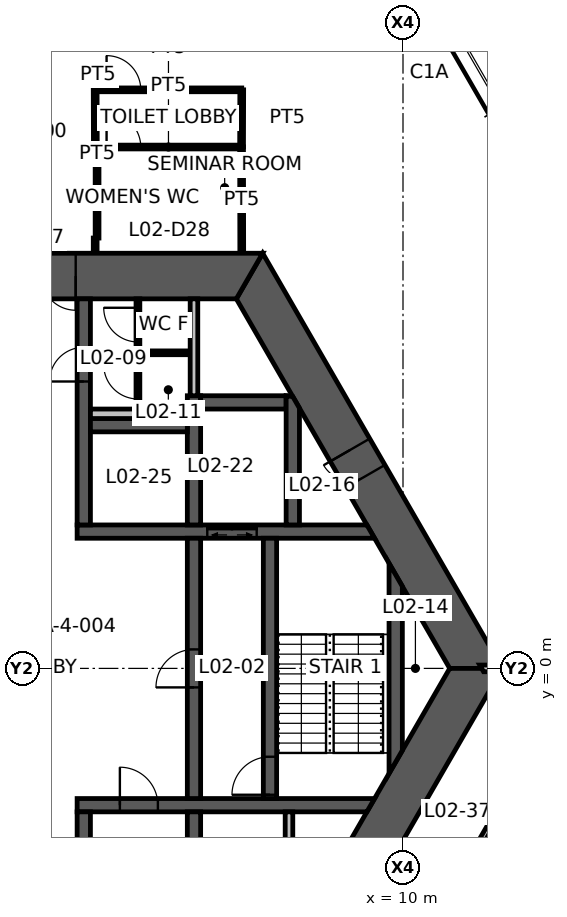
"""IFC4 building model, lengths in metres.
Left out: names, types, materials, properties, quantities, classifications, styles, units other than length and angle.
Written with IfcOpenShell. Run it as: python <this file> out.ifc"""

import sys

from ifc_helpers import new_model, si_unit, direction, frame, frame_2d, origin, place, context, subcontext, project, spatial, polyline, rectangle, outline, extrude, element, fill, save


model = new_model("IFC4")
c1 = context("Model", 3, precision=1e-05, world=origin(), true_north=direction((0.0, 1.0)))
c2 = subcontext(c1, "Body", "Model", "MODEL_VIEW")
j1 = project(units=[si_unit("LENGTHUNIT", "METRE"), si_unit("PLANEANGLEUNIT", "RADIAN")], contexts=[c1])
p1 = place(None, origin())
s1 = spatial("IfcSite", under=j1, at=p1, CompositionType="ELEMENT")
p2 = place(p1, origin())
s2 = spatial("IfcBuilding", under=s1, at=p2, CompositionType="ELEMENT")
p3 = place(p2, frame((0.0, 0.0, 5.5)))
s3 = spatial("IfcBuildingStorey", under=s2, at=p3, CompositionType="ELEMENT", Elevation=5.5)
p4 = place(p3, frame((11.922, 0.0, 0.0), z_axis=(0.0, 0.0, 1.0), x_axis=(-0.500004296715, 0.866022923061, 0.0)))
e1 = element("IfcWall", 1, at=p4, inside=s3, PredefinedType="SHEAR", context=c2, shape_type="SweptSolid", body=[
    extrude(outline(polyline([(-0.346, -0.6), (5.835, -0.6), (6.635, -0.6), (12.269, -0.6), (11.576, 0.6), (6.635, 0.6), (5.835, 0.6), (0.346, 0.6), (-0.346, -0.6)])), origin(), (0.0, 0.0, 1.0), 4.5),
])
p5 = place(p4, frame((5.835, 0.0, 0.0)))
e2 = element("IfcOpeningElement", 2, at=p5, cuts=e1, PredefinedType="OPENING", context=c2, shape_type="SweptSolid", body=[
    extrude(rectangle(XDim=0.8, YDim=2.1, at=frame_2d((0.4, 1.05))), frame((0.0, 0.61, 0.0), z_axis=(0.0, -1.0, 0.0), x_axis=(1.0, 0.0, 0.0)), (0.0, 0.0, 1.0), 1.22),
])
p6 = place(p3, frame((5.961, 10.325, 0.0), z_axis=(0.0, 0.0, 1.0), x_axis=(-1.0, 0.0, 0.0)))
e3 = element("IfcWall", 3, at=p6, inside=s3, PredefinedType="SHEAR", context=c2, shape_type="SweptSolid", body=[
    extrude(outline(polyline([(-0.346, -0.6), (4.574, -0.6), (5.474, -0.6), (6.449, -0.6), (7.349, -0.6), (12.269, -0.6), (11.576, 0.6), (7.349, 0.6), (6.449, 0.6), (5.474, 0.6), (4.574, 0.6), (0.346, 0.6), (-0.346, -0.6)])), origin(), (0.0, 0.0, 1.0), 4.5),
])
p7 = place(p6, frame((6.449, 0.0, 0.0)))
e4 = element("IfcOpeningElement", 4, at=p7, cuts=e3, PredefinedType="OPENING", context=c2, shape_type="SweptSolid", body=[
    extrude(rectangle(XDim=0.9, YDim=2.1, at=frame_2d((0.45, 1.05))), frame((0.0, 0.61, 0.0), z_axis=(0.0, -1.0, 0.0), x_axis=(1.0, 0.0, 0.0)), (0.0, 0.0, 1.0), 1.22),
])
p8 = place(p6, frame((4.574, 0.0, 0.0)))
e5 = element("IfcOpeningElement", 5, at=p8, cuts=e3, PredefinedType="OPENING", context=c2, shape_type="SweptSolid", body=[
    extrude(rectangle(XDim=0.9, YDim=2.1, at=frame_2d((0.45, 1.05))), frame((0.0, 0.61, 0.0), z_axis=(0.0, -1.0, 0.0), x_axis=(1.0, 0.0, 0.0)), (0.0, 0.0, 1.0), 1.22),
])
p9 = place(p3, frame((5.961, -10.325, 0.0), z_axis=(0.0, 0.0, 1.0), x_axis=(0.500004296715, 0.866022923061, 0.0)))
e6 = element("IfcWall", 6, at=p9, inside=s3, PredefinedType="SHEAR", context=c2, shape_type="SweptSolid", body=[
    extrude(outline(polyline([(-0.346, -0.6), (3.208, -0.6), (4.009, -0.6), (12.269, -0.6), (11.576, 0.6), (4.009, 0.6), (3.208, 0.6), (0.346, 0.6), (-0.346, -0.6)])), origin(), (0.0, 0.0, 1.0), 4.5),
])
p10 = place(p9, frame((3.208, 0.0, 0.0)))
e7 = element("IfcOpeningElement", 7, at=p10, cuts=e6, PredefinedType="OPENING", context=c2, shape_type="SweptSolid", body=[
    extrude(rectangle(XDim=0.8, YDim=2.1, at=frame_2d((0.4, 1.05))), frame((0.0, 0.61, 0.0), z_axis=(0.0, -1.0, 0.0), x_axis=(1.0, 0.0, 0.0)), (0.0, 0.0, 1.0), 1.22),
])
p11 = place(p3, frame((1.425, 3.6, 0.0), z_axis=(0.0, 0.0, 1.0), x_axis=(1.0, 0.0, 0.0)))
e8 = element("IfcWall", 8, at=p11, inside=s3, PredefinedType="SHEAR", context=c2, shape_type="SweptSolid", body=[
    extrude(outline(polyline([(0.0, -0.175), (3.425, -0.175), (4.725, -0.175), (7.827, -0.175), (7.625, 0.175), (4.725, 0.175), (3.425, 0.175), (0.0, 0.175), (0.0, -0.175)])), origin(), (0.0, 0.0, 1.0), 4.5),
])
p12 = place(p11, frame((3.425, 0.0, 0.0)))
e9 = element("IfcOpeningElement", 9, at=p12, cuts=e8, PredefinedType="OPENING", context=c2, shape_type="SweptSolid", body=[
    extrude(rectangle(XDim=1.3, YDim=2.1, at=frame_2d((0.65, 1.05))), frame((0.0, 0.185, 0.0), z_axis=(0.0, -1.0, 0.0), x_axis=(1.0, 0.0, 0.0)), (0.0, 0.0, 1.0), 0.37),
])
p13 = place(p3, frame((1.425, -3.6, 0.0), z_axis=(0.0, 0.0, 1.0), x_axis=(1.0, 0.0, 0.0)))
e10 = element("IfcWall", 10, at=p13, inside=s3, PredefinedType="SHEAR", context=c2, shape_type="SweptSolid", body=[
    extrude(outline(polyline([(0.0, -0.175), (1.125, -0.175), (2.125, -0.175), (7.625, -0.175), (7.827, 0.175), (2.125, 0.175), (1.125, 0.175), (0.0, 0.175), (0.0, -0.175)])), origin(), (0.0, 0.0, 1.0), 4.5),
])
p14 = place(p13, frame((1.125, 0.0, 0.0)))
e11 = element("IfcOpeningElement", 11, at=p14, cuts=e10, PredefinedType="OPENING", context=c2, shape_type="SweptSolid", body=[
    extrude(rectangle(XDim=1.0, YDim=2.1, at=frame_2d((0.5, 1.05))), frame((0.0, 0.185, 0.0), z_axis=(0.0, -1.0, 0.0), x_axis=(1.0, 0.0, 0.0)), (0.0, 0.0, 1.0), 0.37),
])
p15 = place(p3, frame((1.6, 3.775, 0.0), z_axis=(0.0, 0.0, 1.0), x_axis=(0.0, 1.0, 0.0)))
e12 = element("IfcWall", 12, at=p15, inside=s3, PredefinedType="SHEAR", context=c2, shape_type="SweptSolid", body=[
    extrude(rectangle(XDim=5.95, YDim=0.35, at=frame_2d((2.975, 0.0))), origin(), (0.0, 0.0, 1.0), 4.5),
])
p16 = place(p15, frame((3.775, 0.0, 0.0)))
e13 = element("IfcOpeningElement", 13, at=p16, cuts=e12, PredefinedType="OPENING", context=c2, shape_type="SweptSolid", body=[
    extrude(rectangle(XDim=0.9, YDim=2.1, at=frame_2d((0.45, 1.05))), frame((0.0, 0.185, 0.0), z_axis=(0.0, -1.0, 0.0), x_axis=(1.0, 0.0, 0.0)), (0.0, 0.0, 1.0), 0.37),
])
p17 = place(p3, frame((1.6, -3.775, 0.0), z_axis=(0.0, 0.0, 1.0), x_axis=(0.0, -1.0, 0.0)))
e14 = element("IfcWall", 14, at=p17, inside=s3, PredefinedType="SHEAR", context=c2, shape_type="SweptSolid", body=[
    extrude(rectangle(XDim=5.95, YDim=0.35, at=frame_2d((2.975, 0.0))), origin(), (0.0, 0.0, 1.0), 4.5),
])
p18 = place(p17, frame((3.625, 0.0, 0.0)))
e15 = element("IfcOpeningElement", 15, at=p18, cuts=e14, PredefinedType="OPENING", context=c2, shape_type="SweptSolid", body=[
    extrude(rectangle(XDim=1.2, YDim=2.1, at=frame_2d((0.6, 1.05))), frame((0.0, 0.185, 0.0), z_axis=(0.0, -1.0, 0.0), x_axis=(1.0, 0.0, 0.0)), (0.0, 0.0, 1.0), 0.37),
])
p19 = place(p3, frame((4.5, -3.425, 0.0), z_axis=(0.0, 0.0, 1.0), x_axis=(0.0, 1.0, 0.0)))
e16 = element("IfcWall", 16, at=p19, inside=s3, PredefinedType="SHEAR", context=c2, shape_type="SweptSolid", body=[
    extrude(rectangle(XDim=6.85, YDim=0.35, at=frame_2d((3.425, 0.0))), origin(), (0.0, 0.0, 1.0), 4.5),
])
p20 = place(p19, frame((2.925, 0.0, 0.0)))
e17 = element("IfcOpeningElement", 17, at=p20, cuts=e16, PredefinedType="OPENING", context=c2, shape_type="SweptSolid", body=[
    extrude(rectangle(XDim=1.0, YDim=2.1, at=frame_2d((0.5, 1.05))), frame((0.0, 0.185, 0.0), z_axis=(0.0, -1.0, 0.0), x_axis=(1.0, 0.0, 0.0)), (0.0, 0.0, 1.0), 0.37),
])
p21 = place(p3, frame((6.5, -3.425, 0.0), z_axis=(0.0, 0.0, 1.0), x_axis=(0.0, 1.0, 0.0)))
e18 = element("IfcWall", 18, at=p21, inside=s3, PredefinedType="SHEAR", context=c2, shape_type="SweptSolid", body=[
    extrude(rectangle(XDim=6.85, YDim=0.35, at=frame_2d((3.425, 0.0))), origin(), (0.0, 0.0, 1.0), 4.5),
])
p22 = place(p21, frame((0.1, 0.0, 0.0)))
e19 = element("IfcOpeningElement", 19, at=p22, cuts=e18, PredefinedType="OPENING", context=c2, shape_type="SweptSolid", body=[
    extrude(rectangle(XDim=1.0, YDim=2.1, at=frame_2d((0.5, 1.05))), frame((0.0, 0.185, 0.0), z_axis=(0.0, -1.0, 0.0), x_axis=(1.0, 0.0, 0.0)), (0.0, 0.0, 1.0), 0.37),
])
p23 = place(p3, frame((4.5, 3.775, 0.0), z_axis=(0.0, 0.0, 1.0), x_axis=(0.0, 1.0, 0.0)))
e20 = element("IfcWall", 20, at=p23, inside=s3, PredefinedType="SHEAR", context=c2, shape_type="SweptSolid", body=[
    extrude(rectangle(XDim=3.4, YDim=0.35, at=frame_2d((1.7, 0.0))), origin(), (0.0, 0.0, 1.0), 4.5),
])
p24 = place(p3, frame((4.5, -3.775, 0.0), z_axis=(0.0, 0.0, 1.0), x_axis=(0.0, -1.0, 0.0)))
e21 = element("IfcWall", 21, at=p24, inside=s3, PredefinedType="SHEAR", context=c2, shape_type="SweptSolid", body=[
    extrude(rectangle(XDim=5.95, YDim=0.35, at=frame_2d((2.975, 0.0))), origin(), (0.0, 0.0, 1.0), 4.5),
])
p25 = place(p24, frame((0.712, 0.0, 0.0)))
e22 = element("IfcOpeningElement", 22, at=p25, cuts=e21, PredefinedType="OPENING", context=c2, shape_type="SweptSolid", body=[
    extrude(rectangle(XDim=1.1, YDim=2.1, at=frame_2d((0.55, 1.05))), frame((0.0, 0.185, 0.0), z_axis=(0.0, -1.0, 0.0), x_axis=(1.0, 0.0, 0.0)), (0.0, 0.0, 1.0), 0.37),
])
p26 = place(p3, frame((1.775, 6.4, 0.0), z_axis=(0.0, 0.0, 1.0), x_axis=(1.0, 0.0, 0.0)))
e23 = element("IfcWall", 23, at=p26, inside=s3, PredefinedType="SHEAR", context=c2, shape_type="SweptSolid", body=[
    extrude(rectangle(XDim=2.55, YDim=0.35, at=frame_2d((1.275, 0.0))), origin(), (0.0, 0.0, 1.0), 4.5),
])
p27 = place(p3, frame((4.675, 7.0, 0.0), z_axis=(0.0, 0.0, 1.0), x_axis=(1.0, 0.0, 0.0)))
e24 = element("IfcWall", 24, at=p27, inside=s3, PredefinedType="SHEAR", context=c2, shape_type="SweptSolid", body=[
    extrude(rectangle(XDim=2.25, YDim=0.35, at=frame_2d((1.125, 0.0))), origin(), (0.0, 0.0, 1.0), 4.5),
])
p28 = place(p3, frame((7.1, 3.775, 0.0), z_axis=(0.0, 0.0, 1.0), x_axis=(0.0, 1.0, 0.0)))
e25 = element("IfcWall", 25, at=p28, inside=s3, PredefinedType="SHEAR", context=c2, shape_type="SweptSolid", body=[
    extrude(outline(polyline([(0.0, -0.175), (3.074, -0.175), (3.377, 0.0), (3.4, 0.175), (0.0, 0.175), (0.0, -0.175)])), origin(), (0.0, 0.0, 1.0), 4.5),
])
p29 = place(p3, frame((9.808, -2.462, 0.0), z_axis=(0.0, 0.0, 1.0), x_axis=(0.0, 1.0, 0.0)))
e26 = element("IfcWall", 26, at=p29, inside=s3, PredefinedType="SHEAR", context=c2, shape_type="SweptSolid", body=[
    extrude(outline(polyline([(0.303, -0.175), (4.621, -0.175), (5.228, 0.175), (-0.303, 0.175), (0.303, -0.175)])), origin(), (0.0, 0.0, 1.0), 4.5),
])
p30 = place(p3, frame((4.5, 7.175, 0.0), z_axis=(0.0, 0.0, 1.0), x_axis=(0.0, 1.0, 0.0)))
e27 = element("IfcWall", 27, at=p30, inside=s3, PredefinedType="STANDARD", context=c2, shape_type="SweptSolid", body=[
    extrude(rectangle(XDim=2.55, YDim=0.2, at=frame_2d((1.275, 0.0))), origin(), (0.0, 0.0, 1.0), 4.5),
])
p31 = place(p3, frame((7.0, -3.775, 0.0), z_axis=(0.0, 0.0, 1.0), x_axis=(0.0, -1.0, 0.0)))
e28 = element("IfcWall", 28, at=p31, inside=s3, PredefinedType="STANDARD", context=c2, shape_type="SweptSolid", body=[
    extrude(rectangle(XDim=2.525, YDim=0.2, at=frame_2d((1.263, 0.0))), origin(), (0.0, 0.0, 1.0), 4.5),
])
p32 = place(p3, frame((1.775, 6.7, 0.0), z_axis=(0.0, 0.0, 1.0), x_axis=(1.0, 0.0, 0.0)))
e29 = element("IfcWall", 29, at=p32, inside=s3, PredefinedType="PLUMBINGWALL", context=c2, shape_type="SweptSolid", body=[
    extrude(rectangle(XDim=2.55, YDim=0.25, at=frame_2d((1.275, 0.0))), origin(), (0.0, 0.0, 1.0), 4.5),
])
p33 = place(p3, frame((3.025, 6.575, 0.0), z_axis=(0.0, 0.0, 1.0), x_axis=(0.0, 1.0, 0.0)))
e30 = element("IfcWall", 30, at=p33, inside=s3, PredefinedType="PARTITIONING", context=c2, shape_type="SweptSolid", body=[
    extrude(rectangle(XDim=3.15, YDim=0.1, at=frame_2d((1.575, 0.0))), origin(), (0.0, 0.0, 1.0), 3.5),
])
p34 = place(p33, frame((2.015, 0.0, 0.0)))
e31 = element("IfcOpeningElement", 31, at=p34, cuts=e30, PredefinedType="OPENING", context=c2, shape_type="SweptSolid", body=[
    extrude(rectangle(XDim=0.9, YDim=2.1, at=frame_2d((0.45, 1.05))), frame((0.0, 0.06, 0.0), z_axis=(0.0, -1.0, 0.0), x_axis=(1.0, 0.0, 0.0)), (0.0, 0.0, 1.0), 0.12),
])
p35 = place(p33, frame((0.515, 0.0, 0.0)))
e32 = element("IfcOpeningElement", 32, at=p35, cuts=e30, PredefinedType="OPENING", context=c2, shape_type="SweptSolid", body=[
    extrude(rectangle(XDim=0.9, YDim=2.1, at=frame_2d((0.45, 1.05))), frame((0.0, 0.06, 0.0), z_axis=(0.0, -1.0, 0.0), x_axis=(1.0, 0.0, 0.0)), (0.0, 0.0, 1.0), 0.12),
])
p36 = place(p3, frame((3.075, 8.305, 0.0), z_axis=(0.0, 0.0, 1.0), x_axis=(1.0, 0.0, 0.0)))
e33 = element("IfcWall", 33, at=p36, inside=s3, PredefinedType="PARTITIONING", context=c2, shape_type="SweptSolid", body=[
    extrude(rectangle(XDim=1.25, YDim=0.1, at=frame_2d((0.625, 0.0))), origin(), (0.0, 0.0, 1.0), 3.5),
])
p37 = place(p3, frame((12.07, 0.0, 0.0), z_axis=(0.0, 0.0, 1.0), x_axis=(1.0, 0.0, 0.0)))
e34 = element("IfcWall", 34, at=p37, inside=s3, PredefinedType="PARTITIONING", context=c2, shape_type="SweptSolid", body=[
    extrude(outline(polyline([(0.051, -0.087), (1.129, -0.087), (2.129, -0.087), (7.93, -0.087), (7.93, 0.087), (2.129, 0.087), (1.129, 0.087), (-0.051, 0.087), (0.051, -0.087)])), origin(), (0.0, 0.0, 1.0), 3.6),
])
p38 = place(p37, frame((1.129, 0.0, 0.0)))
e35 = element("IfcOpeningElement", 35, at=p38, cuts=e34, PredefinedType="OPENING", context=c2, shape_type="SweptSolid", body=[
    extrude(rectangle(XDim=1.0, YDim=2.1, at=frame_2d((0.5, 1.05))), frame((0.0, 0.098, 0.0), z_axis=(0.0, -1.0, 0.0), x_axis=(1.0, 0.0, 0.0)), (0.0, 0.0, 1.0), 0.195),
])
p39 = place(p3, frame((1.9, 13.72, 0.0), z_axis=(0.0, 0.0, 1.0), x_axis=(1.0, 0.0, 0.0)))
e36 = element("IfcWall", 36, at=p39, inside=s3, PredefinedType="PARTITIONING", context=c2, shape_type="SweptSolid", body=[
    extrude(rectangle(XDim=3.857, YDim=0.1, at=frame_2d((1.929, 0.0))), origin(), (0.0, 0.0, 1.0), 3.5),
])
p40 = place(p39, frame((0.3, 0.0, 0.0)))
e37 = element("IfcOpeningElement", 37, at=p40, cuts=e36, PredefinedType="OPENING", context=c2, shape_type="SweptSolid", body=[
    extrude(rectangle(XDim=0.9, YDim=2.1, at=frame_2d((0.45, 1.05))), frame((0.0, 0.06, 0.0), z_axis=(0.0, -1.0, 0.0), x_axis=(1.0, 0.0, 0.0)), (0.0, 0.0, 1.0), 0.12),
])
p41 = place(p3, frame((1.9, 10.945, 0.0), z_axis=(0.0, 0.0, 1.0), x_axis=(0.0, 1.0, 0.0)))
e38 = element("IfcWall", 38, at=p41, inside=s3, PredefinedType="PARTITIONING", context=c2, shape_type="SweptSolid", body=[
    extrude(rectangle(XDim=0.38, YDim=0.1, at=frame_2d((0.19, 0.0))), origin(), (0.0, 0.0, 1.0), 3.5),
])
p42 = place(p3, frame((1.95, 11.325, 0.0), z_axis=(0.0, 0.0, 1.0), x_axis=(0.0, 1.0, 0.0)))
e39 = element("IfcWall", 39, at=p42, inside=s3, PredefinedType="PARTITIONING", context=c2, shape_type="SweptSolid", body=[
    extrude(rectangle(XDim=2.2, YDim=0.1, at=frame_2d((1.1, 0.0))), origin(), (0.0, 0.0, 1.0), 3.5),
])
p43 = place(p3, frame((5.752, 13.725, 0.0), z_axis=(0.0, 0.0, 1.0), x_axis=(0.001756386155, -0.999998457553, 0.0)))
e40 = element("IfcWall", 40, at=p43, inside=s3, PredefinedType="PARTITIONING", context=c2, shape_type="SweptSolid", body=[
    extrude(rectangle(XDim=2.78, YDim=0.1, at=frame_2d((1.39, 0.0))), origin(), (0.0, 0.0, 1.0), 3.5),
])
p44 = place(p3, frame((1.9, 15.225, 0.0), z_axis=(0.0, 0.0, 1.0), x_axis=(1.0, 0.0, 0.0)))
e41 = element("IfcWall", 41, at=p44, inside=s3, PredefinedType="PARTITIONING", context=c2, shape_type="SweptSolid", body=[
    extrude(rectangle(XDim=3.857, YDim=0.1, at=frame_2d((1.929, 0.0))), origin(), (0.0, 0.0, 1.0), 3.5),
])
p45 = place(p44, frame((0.3, 0.0, 0.0)))
e42 = element("IfcOpeningElement", 42, at=p45, cuts=e41, PredefinedType="OPENING", context=c2, shape_type="SweptSolid", body=[
    extrude(rectangle(XDim=0.9, YDim=2.1, at=frame_2d((0.45, 1.05))), frame((0.0, 0.06, 0.0), z_axis=(0.0, -1.0, 0.0), x_axis=(1.0, 0.0, 0.0)), (0.0, 0.0, 1.0), 0.12),
])
for number, where, z_axis, x_axis in (
    (43, (1.905, 13.725, 0.0), (0.0, 0.0, 1.0), (-0.003, 1.0, 0.0)),
    (44, (5.757, 15.225, 0.0), (0.0, 0.0, 1.0), (-0.003, -1.0, 0.0)),
):
    element("IfcWall", number, at=place(p3, frame(where, z_axis=z_axis, x_axis=x_axis)), inside=s3, PredefinedType="PARTITIONING", context=c2, shape_type="SweptSolid", body=[
        extrude(rectangle(XDim=1.5, YDim=0.1, at=frame_2d((0.75, 0.0))), origin(), (0.0, 0.0, 1.0), 3.5),
    ])
p46 = place(p3, frame((14.682, -0.02, 0.0), z_axis=(0.0, 0.0, 1.0), x_axis=(-0.499985579985, -0.866033729024, 0.0)))
e45 = element("IfcWall", 45, at=p46, inside=s3, PredefinedType="PARTITIONING", context=c2, shape_type="SweptSolid", body=[
    extrude(rectangle(XDim=6.854, YDim=0.15, at=frame_2d((3.427, 0.0))), origin(), (0.0, 0.0, 1.0), 3.5),
])
p47 = place(p46, frame((2.927, 0.0, 0.0)))
e46 = element("IfcOpeningElement", 46, at=p47, cuts=e45, PredefinedType="OPENING", context=c2, shape_type="SweptSolid", body=[
    extrude(rectangle(XDim=1.0, YDim=2.1, at=frame_2d((0.5, 1.05))), frame((0.0, 0.085, 0.0), z_axis=(0.0, -1.0, 0.0), x_axis=(1.0, 0.0, 0.0)), (0.0, 0.0, 1.0), 0.17),
])
p48 = place(p8, origin())
e47 = element("IfcDoor", 47, at=p48, inside=s3, OperationType="SINGLE_SWING_LEFT", PredefinedType="DOOR", context=c2, shape_type="SweptSolid", body=[
    extrude(rectangle(XDim=0.9, YDim=2.1, at=frame_2d((0.45, 1.05))), frame((0.0, 0.025, 0.0), z_axis=(0.0, -1.0, 0.0), x_axis=(1.0, 0.0, 0.0)), (0.0, 0.0, 1.0), 0.05),
])
fill(e5, e47)
p49 = place(p5, origin())
e48 = element("IfcDoor", 48, at=p49, inside=s3, OperationType="SINGLE_SWING_RIGHT", PredefinedType="DOOR", context=c2, shape_type="SweptSolid", body=[
    extrude(rectangle(XDim=0.8, YDim=2.1, at=frame_2d((0.4, 1.05))), frame((0.0, 0.025, 0.0), z_axis=(0.0, -1.0, 0.0), x_axis=(1.0, 0.0, 0.0)), (0.0, 0.0, 1.0), 0.05),
])
fill(e2, e48)
p50 = place(p20, origin())
e49 = element("IfcDoor", 49, at=p50, inside=s3, OperationType="SINGLE_SWING_LEFT", PredefinedType="DOOR", context=c2, shape_type="SweptSolid", body=[
    extrude(rectangle(XDim=1.0, YDim=2.1, at=frame_2d((0.5, 1.05))), frame((0.0, 0.025, 0.0), z_axis=(0.0, -1.0, 0.0), x_axis=(1.0, 0.0, 0.0)), (0.0, 0.0, 1.0), 0.05),
])
fill(e17, e49)
p51 = place(p22, origin())
e50 = element("IfcDoor", 50, at=p51, inside=s3, OperationType="SINGLE_SWING_LEFT", PredefinedType="DOOR", context=c2, shape_type="SweptSolid", body=[
    extrude(rectangle(XDim=1.0, YDim=2.1, at=frame_2d((0.5, 1.05))), frame((0.0, 0.025, 0.0), z_axis=(0.0, -1.0, 0.0), x_axis=(1.0, 0.0, 0.0)), (0.0, 0.0, 1.0), 0.05),
])
fill(e19, e50)
p52 = place(p16, origin())
e51 = element("IfcDoor", 51, at=p52, inside=s3, OperationType="SINGLE_SWING_LEFT", PredefinedType="DOOR", context=c2, shape_type="SweptSolid", body=[
    extrude(rectangle(XDim=0.9, YDim=2.1, at=frame_2d((0.45, 1.05))), frame((0.0, 0.025, 0.0), z_axis=(0.0, -1.0, 0.0), x_axis=(1.0, 0.0, 0.0)), (0.0, 0.0, 1.0), 0.05),
])
fill(e13, e51)
p53 = place(p14, origin())
e52 = element("IfcDoor", 52, at=p53, inside=s3, OperationType="SINGLE_SWING_LEFT", PredefinedType="DOOR", context=c2, shape_type="SweptSolid", body=[
    extrude(rectangle(XDim=1.0, YDim=2.1, at=frame_2d((0.5, 1.05))), frame((0.0, 0.025, 0.0), z_axis=(0.0, -1.0, 0.0), x_axis=(1.0, 0.0, 0.0)), (0.0, 0.0, 1.0), 0.05),
])
fill(e11, e52)
p54 = place(p34, origin())
e53 = element("IfcDoor", 53, at=p54, inside=s3, OperationType="SINGLE_SWING_RIGHT", PredefinedType="DOOR", context=c2, shape_type="SweptSolid", body=[
    extrude(rectangle(XDim=0.9, YDim=2.1, at=frame_2d((0.45, 1.05))), frame((0.0, 0.025, 0.0), z_axis=(0.0, -1.0, 0.0), x_axis=(1.0, 0.0, 0.0)), (0.0, 0.0, 1.0), 0.05),
])
fill(e31, e53)
p55 = place(p35, origin())
e54 = element("IfcDoor", 54, at=p55, inside=s3, OperationType="SINGLE_SWING_RIGHT", PredefinedType="DOOR", context=c2, shape_type="SweptSolid", body=[
    extrude(rectangle(XDim=0.9, YDim=2.1, at=frame_2d((0.45, 1.05))), frame((0.0, 0.025, 0.0), z_axis=(0.0, -1.0, 0.0), x_axis=(1.0, 0.0, 0.0)), (0.0, 0.0, 1.0), 0.05),
])
fill(e32, e54)
p56 = place(p40, origin())
e55 = element("IfcDoor", 55, at=p56, inside=s3, OperationType="SINGLE_SWING_LEFT", PredefinedType="DOOR", context=c2, shape_type="SweptSolid", body=[
    extrude(rectangle(XDim=0.9, YDim=2.1, at=frame_2d((0.45, 1.05))), frame((0.0, 0.025, 0.0), z_axis=(0.0, -1.0, 0.0), x_axis=(1.0, 0.0, 0.0)), (0.0, 0.0, 1.0), 0.05),
])
fill(e37, e55)
p57 = place(p45, origin())
e56 = element("IfcDoor", 56, at=p57, inside=s3, OperationType="SINGLE_SWING_LEFT", PredefinedType="DOOR", context=c2, shape_type="SweptSolid", body=[
    extrude(rectangle(XDim=0.9, YDim=2.1, at=frame_2d((0.45, 1.05))), frame((0.0, 0.025, 0.0), z_axis=(0.0, -1.0, 0.0), x_axis=(1.0, 0.0, 0.0)), (0.0, 0.0, 1.0), 0.05),
])
fill(e42, e56)
p58 = place(p12, origin())
e57 = element("IfcDoor", 57, at=p58, inside=s3, OperationType="DOUBLE_DOOR_SLIDING", PredefinedType="DOOR", context=c2, shape_type="SweptSolid", body=[
    extrude(rectangle(XDim=1.3, YDim=2.1, at=frame_2d((0.65, 1.05))), frame((0.0, 0.025, 0.0), z_axis=(0.0, -1.0, 0.0), x_axis=(1.0, 0.0, 0.0)), (0.0, 0.0, 1.0), 0.05),
])
fill(e9, e57)
save(model, sys.argv[1])
